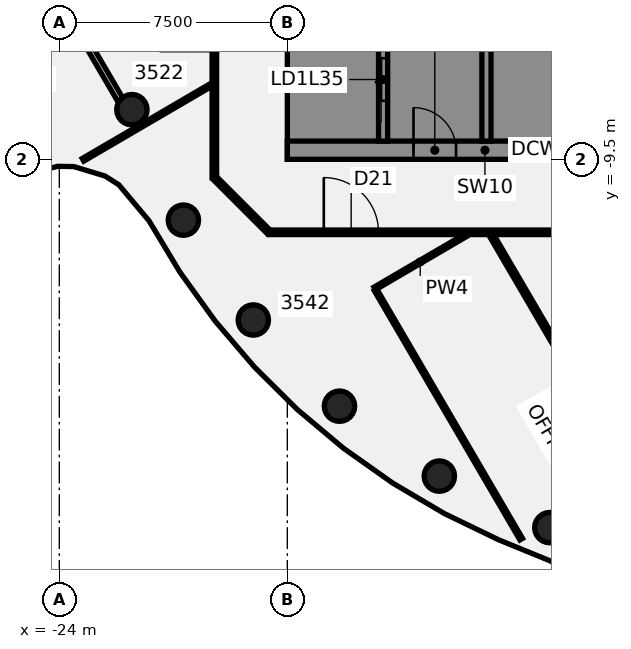
"""IFC4 building model, lengths in metres.
Left out: names, types, materials, properties, quantities, classifications, styles, units other than length and angle.
Written with IfcOpenShell. Run it as: python <this file> out.ifc"""

import sys

from ifc_helpers import new_model, si_unit, direction, frame, frame_2d, origin, origin_2d, place, context, subcontext, project, spatial, polyline, rectangle, circle, outline, extrude, element, fill, save


model = new_model("IFC4")
c1 = context("Model", 3, precision=1e-05, world=origin(), true_north=direction((0.0, 1.0)))
c2 = subcontext(c1, "Body", "Model", "MODEL_VIEW")
j1 = project(units=[si_unit("LENGTHUNIT", "METRE"), si_unit("PLANEANGLEUNIT", "RADIAN")], contexts=[c1])
p1 = place(None, origin())
s1 = spatial("IfcSite", under=j1, at=p1, CompositionType="ELEMENT")
p2 = place(p1, origin())
s2 = spatial("IfcBuilding", under=s1, at=p2, CompositionType="ELEMENT")
p3 = place(p2, frame((0.0, 0.0, 144.25)))
s3 = spatial("IfcBuildingStorey", under=s2, at=p3, CompositionType="ELEMENT", Elevation=144.25)
for number, where, z_axis, x_axis in (
    (1, (-21.613, -7.866, -0.14), (0.0, 0.0, 1.0), (1.0, 0.0, 0.0)),
    (2, (-19.919, -11.5, -0.14), (0.0, 0.0, 1.0), (1.0, 0.0, 0.0)),
    (3, (-17.619, -14.784, -0.14), (0.0, 0.0, 1.0), (1.0, 0.0, 0.0)),
    (4, (-14.784, -17.619, -0.14), (0.0, 0.0, 1.0), (1.0, 0.0, 0.0)),
    (5, (-11.5, -19.919, -0.14), (0.0, 0.0, 1.0), (1.0, 0.0, 0.0)),
    (6, (-7.866, -21.613, -0.14), (0.0, 0.0, 1.0), (1.0, 0.0, 0.0)),
):
    element("IfcColumn", number, at=place(p3, frame(where, z_axis=z_axis, x_axis=x_axis)), inside=s3, PredefinedType="COLUMN", context=c2, shape_type="SweptSolid", body=[
        extrude(circle(Radius=0.5, at=origin_2d()), origin(), (0.0, 0.0, 1.0), 3.75),
    ])
p4 = place(p3, frame((-28.66, 3.867, 0.0), z_axis=(0.0, 0.0, 1.0), x_axis=(0.504524218803, -0.863397540326, 0.0)))
e7 = element("IfcWall", 7, at=p4, inside=s3, PredefinedType="PARTITIONING", context=c2, shape_type="SweptSolid", body=[
    extrude(rectangle(XDim=13.22, YDim=0.2, at=frame_2d((6.61, 0.0))), origin(), (0.0, 0.0, 1.0), 3.01),
])
p5 = place(p4, frame((6.099, 0.0, 0.0)))
e8 = element("IfcOpeningElement", 8, at=p5, cuts=e7, PredefinedType="OPENING", context=c2, shape_type="SweptSolid", body=[
    extrude(rectangle(XDim=1.4, YDim=2.1, at=frame_2d((0.7, 1.05))), frame((0.0, 0.11, 0.0), z_axis=(0.0, -1.0, 0.0), x_axis=(1.0, 0.0, 0.0)), (0.0, 0.0, 1.0), 0.22),
])
p6 = place(p3, frame((-13.6, -13.79, 0.0), z_axis=(0.0, 0.0, 1.0), x_axis=(0.50451801346, -0.863401166373, 0.0)))
e9 = element("IfcWall", 9, at=p6, inside=s3, PredefinedType="PARTITIONING", context=c2, shape_type="SweptSolid", body=[
    extrude(rectangle(XDim=9.5, YDim=0.1, at=frame_2d((4.75, 0.0))), origin(), (0.0, 0.0, 1.0), 3.01),
])
p7 = place(p3, frame((-9.784, -11.995, 0.0), z_axis=(0.0, 0.0, 1.0), x_axis=(0.504549995646, -0.863382477175, 0.0)))
e10 = element("IfcWall", 10, at=p7, inside=s3, PredefinedType="PARTITIONING", context=c2, shape_type="SweptSolid", body=[
    extrude(rectangle(XDim=11.802, YDim=0.15, at=frame_2d((5.901, 0.0))), origin(), (0.0, 0.0, 1.0), 3.01),
])
p8 = place(p7, frame((3.79, 0.0, 0.0)))
e11 = element("IfcOpeningElement", 11, at=p8, cuts=e10, PredefinedType="OPENING", context=c2, shape_type="SweptSolid", body=[
    extrude(rectangle(XDim=0.9, YDim=2.1, at=frame_2d((0.45, 1.05))), frame((0.0, 0.085, 0.0), z_axis=(0.0, -1.0, 0.0), x_axis=(1.0, 0.0, 0.0)), (0.0, 0.0, 1.0), 0.17),
])
p9 = place(p3, frame((-18.872, -10.128, 0.0), z_axis=(0.0, 0.0, 1.0), x_axis=(0.707106781187, -0.707106781187, 0.0)))
e12 = element("IfcWall", 12, at=p9, inside=s3, PredefinedType="PARTITIONING", context=c2, shape_type="SweptSolid", body=[
    extrude(rectangle(XDim=2.465, YDim=0.15, at=frame_2d((1.232, 0.0))), origin(), (0.0, 0.0, 1.0), 3.01),
])
p10 = place(p3, frame((-17.1, -11.9, 0.0), z_axis=(0.0, 0.0, 1.0), x_axis=(1.0, 0.0, 0.0)))
e13 = element("IfcWall", 13, at=p10, inside=s3, PredefinedType="PARTITIONING", context=c2, shape_type="SweptSolid", body=[
    extrude(rectangle(XDim=34.165, YDim=0.15, at=frame_2d((17.083, 0.0))), origin(), (0.0, 0.0, 1.0), 3.01),
])
p11 = place(p10, frame((10.26, 0.0, 0.0)))
e14 = element("IfcOpeningElement", 14, at=p11, cuts=e13, PredefinedType="OPENING", context=c2, shape_type="SweptSolid", body=[
    extrude(rectangle(XDim=1.8, YDim=2.1, at=frame_2d((0.9, 1.05))), frame((0.0, 0.085, 0.0), z_axis=(0.0, -1.0, 0.0), x_axis=(1.0, 0.0, 0.0)), (0.0, 0.0, 1.0), 0.17),
])
p12 = place(p10, frame((1.8, 0.0, 0.0)))
e15 = element("IfcOpeningElement", 15, at=p12, cuts=e13, PredefinedType="OPENING", context=c2, shape_type="SweptSolid", body=[
    extrude(rectangle(XDim=1.8, YDim=2.1, at=frame_2d((0.9, 1.05))), frame((0.0, 0.085, 0.0), z_axis=(0.0, -1.0, 0.0), x_axis=(1.0, 0.0, 0.0)), (0.0, 0.0, 1.0), 0.17),
])
p13 = place(p10, frame((26.151, 0.0, 0.0)))
e16 = element("IfcOpeningElement", 16, at=p13, cuts=e13, PredefinedType="OPENING", context=c2, shape_type="SweptSolid", body=[
    extrude(rectangle(XDim=1.8, YDim=2.1, at=frame_2d((0.9, 1.05))), frame((0.0, 0.085, 0.0), z_axis=(0.0, -1.0, 0.0), x_axis=(1.0, 0.0, 0.0)), (0.0, 0.0, 1.0), 0.17),
])
p14 = place(p3, frame((-23.22, -9.516, 0.0), z_axis=(0.0, 0.0, 1.0), x_axis=(0.863381791964, 0.504551168173, 0.0)))
e17 = element("IfcWall", 17, at=p14, inside=s3, PredefinedType="PARTITIONING", context=c2, shape_type="SweptSolid", body=[
    extrude(rectangle(XDim=4.909, YDim=0.1, at=frame_2d((2.455, 0.0))), origin(), (0.0, 0.0, 1.0), 3.01),
])
p15 = place(p3, frame((-13.625, -13.747, 0.0), z_axis=(0.0, 0.0, 1.0), x_axis=(0.863323711201, 0.504650542136, 0.0)))
e18 = element("IfcWall", 18, at=p15, inside=s3, PredefinedType="PARTITIONING", context=c2, shape_type="SweptSolid", body=[
    extrude(rectangle(XDim=3.465, YDim=0.1, at=frame_2d((1.733, 0.0))), origin(), (0.0, 0.0, 1.0), 3.01),
])
p16 = place(p3, frame((-18.9, -10.1, 0.0), z_axis=(0.0, 0.0, 1.0), x_axis=(0.0, 1.0, 0.0)))
e19 = element("IfcWall", 19, at=p16, inside=s3, PredefinedType="PARTITIONING", context=c2, shape_type="SweptSolid", body=[
    extrude(rectangle(XDim=20.2, YDim=0.15, at=frame_2d((10.1, 0.0))), origin(), (0.0, 0.0, 1.0), 3.01),
])
p17 = place(p16, frame((11.874, 0.0, 0.0)))
e20 = element("IfcOpeningElement", 20, at=p17, cuts=e19, PredefinedType="OPENING", context=c2, shape_type="SweptSolid", body=[
    extrude(rectangle(XDim=1.8, YDim=2.1, at=frame_2d((0.9, 1.05))), frame((0.0, 0.085, 0.0), z_axis=(0.0, -1.0, 0.0), x_axis=(1.0, 0.0, 0.0)), (0.0, 0.0, 1.0), 0.17),
])
p18 = place(p16, frame((4.159, 0.0, 0.0)))
e21 = element("IfcOpeningElement", 21, at=p18, cuts=e19, PredefinedType="OPENING", context=c2, shape_type="SweptSolid", body=[
    extrude(rectangle(XDim=1.8, YDim=2.1, at=frame_2d((0.9, 1.05))), frame((0.0, 0.085, 0.0), z_axis=(0.0, -1.0, 0.0), x_axis=(1.0, 0.0, 0.0)), (0.0, 0.0, 1.0), 0.17),
])
p19 = place(p3, frame((-16.5, -9.2, 0.0), z_axis=(0.0, 0.0, 1.0), x_axis=(1.0, 0.0, 0.0)))
e22 = element("IfcWall", 22, at=p19, inside=s3, PredefinedType="SHEAR", context=c2, shape_type="SweptSolid", body=[
    extrude(rectangle(XDim=13.0, YDim=0.6, at=frame_2d((6.5, 0.0))), origin(), (0.0, 0.0, 1.0), 3.61),
])
p20 = place(p19, frame((4.15, 0.0, 0.0)))
e23 = element("IfcOpeningElement", 23, at=p20, cuts=e22, PredefinedType="OPENING", context=c2, shape_type="SweptSolid", body=[
    extrude(rectangle(XDim=1.4, YDim=2.1, at=frame_2d((0.7, 1.05))), frame((0.0, 0.31, 0.0), z_axis=(0.0, -1.0, 0.0), x_axis=(1.0, 0.0, 0.0)), (0.0, 0.0, 1.0), 0.62),
])
p21 = place(p19, frame((10.125, 0.0, 0.0)))
e24 = element("IfcOpeningElement", 24, at=p21, cuts=e22, PredefinedType="OPENING", context=c2, shape_type="SweptSolid", body=[
    extrude(rectangle(XDim=1.4, YDim=2.1, at=frame_2d((0.7, 1.05))), frame((0.0, 0.31, 0.0), z_axis=(0.0, -1.0, 0.0), x_axis=(1.0, 0.0, 0.0)), (0.0, 0.0, 1.0), 0.62),
])
p22 = place(p3, origin())
e25 = element("IfcWall", 25, at=p22, inside=s3, PredefinedType="SHEAR", context=c2, shape_type="SweptSolid", body=[
    extrude(outline(polyline([(-13.5, -8.125), (-15.9, -8.125), (-15.9, -5.625), (-13.5, -5.625), (-13.5, -5.375), (-15.9, -5.375), (-15.9, 5.375), (-13.5, 5.375), (-13.5, 5.625), (-15.9, 5.625), (-15.9, 8.125), (-13.5, 8.125), (-13.5, 8.9), (-15.9, 8.9), (-16.5, 8.9), (-16.5, -8.9), (-15.9, -8.9), (-13.5, -8.9), (-13.5, -8.125)])), origin(), (0.0, 0.0, 1.0), 3.61),
])
p23 = place(p3, origin())
e26 = element("IfcWall", 26, at=p23, inside=s3, PredefinedType="SHEAR", context=c2, shape_type="SweptSolid", body=[
    extrude(outline(polyline([(-7.5, -8.125), (-9.55, -8.125), (-9.55, -5.625), (-9.8, -5.625), (-9.8, -8.125), (-9.8, -8.9), (-7.5, -8.9), (-7.5, -8.125)])), origin(), (0.0, 0.0, 1.0), 3.61),
])
p24 = place(p3, frame((-13.35, -8.9, 0.0), z_axis=(0.0, 0.0, 1.0), x_axis=(0.0, 1.0, 0.0)))
e27 = element("IfcWall", 27, at=p24, inside=s3, PredefinedType="SHEAR", context=c2, shape_type="SweptSolid", body=[
    extrude(rectangle(XDim=17.8, YDim=0.3, at=frame_2d((8.9, 0.0))), origin(), (0.0, 0.0, 1.0), 3.61),
])
p25 = place(p24, frame((1.325, 0.0, 0.0)))
e28 = element("IfcOpeningElement", 28, at=p25, cuts=e27, PredefinedType="OPENING", context=c2, shape_type="SweptSolid", body=[
    extrude(rectangle(XDim=1.4, YDim=2.1, at=frame_2d((0.7, 1.05))), frame((0.0, 0.16, 0.0), z_axis=(0.0, -1.0, 0.0), x_axis=(1.0, 0.0, 0.0)), (0.0, 0.0, 1.0), 0.32),
])
p26 = place(p24, frame((4.754, 0.0, 0.0)))
e29 = element("IfcOpeningElement", 29, at=p26, cuts=e27, PredefinedType="OPENING", context=c2, shape_type="SweptSolid", body=[
    extrude(rectangle(XDim=1.0, YDim=2.1, at=frame_2d((0.5, 1.05))), frame((0.0, 0.16, 0.0), z_axis=(0.0, -1.0, 0.0), x_axis=(1.0, 0.0, 0.0)), (0.0, 0.0, 1.0), 0.32),
])
p27 = place(p24, frame((10.254, 0.0, 0.0)))
e30 = element("IfcOpeningElement", 30, at=p27, cuts=e27, PredefinedType="OPENING", context=c2, shape_type="SweptSolid", body=[
    extrude(rectangle(XDim=1.0, YDim=2.1, at=frame_2d((0.5, 1.05))), frame((0.0, 0.16, 0.0), z_axis=(0.0, -1.0, 0.0), x_axis=(1.0, 0.0, 0.0)), (0.0, 0.0, 1.0), 0.32),
])
p28 = place(p3, frame((-9.95, -8.9, 0.0), z_axis=(0.0, 0.0, 1.0), x_axis=(0.0, 1.0, 0.0)))
e31 = element("IfcWall", 31, at=p28, inside=s3, PredefinedType="SHEAR", context=c2, shape_type="SweptSolid", body=[
    extrude(rectangle(XDim=17.8, YDim=0.3, at=frame_2d((8.9, 0.0))), origin(), (0.0, 0.0, 1.0), 3.61),
])
p29 = place(p28, frame((4.175, 0.0, 0.0)))
e32 = element("IfcOpeningElement", 32, at=p29, cuts=e31, PredefinedType="OPENING", context=c2, shape_type="SweptSolid", body=[
    extrude(rectangle(XDim=1.2, YDim=2.1, at=frame_2d((0.6, 1.05))), frame((0.0, 0.16, 0.0), z_axis=(0.0, -1.0, 0.0), x_axis=(1.0, 0.0, 0.0)), (0.0, 0.0, 1.0), 0.32),
])
p30 = place(p28, frame((6.925, 0.0, 0.0)))
e33 = element("IfcOpeningElement", 33, at=p30, cuts=e31, PredefinedType="OPENING", context=c2, shape_type="SweptSolid", body=[
    extrude(rectangle(XDim=1.2, YDim=2.1, at=frame_2d((0.6, 1.05))), frame((0.0, 0.16, 0.0), z_axis=(0.0, -1.0, 0.0), x_axis=(1.0, 0.0, 0.0)), (0.0, 0.0, 1.0), 0.32),
])
p31 = place(p8, frame((0.9, 0.0, 0.0), z_axis=(0.0, 0.0, 1.0), x_axis=(-1.0, 0.0, 0.0)))
e34 = element("IfcDoor", 34, at=p31, inside=s3, OperationType="SINGLE_SWING_LEFT", PredefinedType="DOOR", context=c2, shape_type="SweptSolid", body=[
    extrude(rectangle(XDim=0.9, YDim=2.1, at=frame_2d((0.45, 1.05))), frame((0.0, 0.025, 0.0), z_axis=(0.0, -1.0, 0.0), x_axis=(1.0, 0.0, 0.0)), (0.0, 0.0, 1.0), 0.05),
])
fill(e11, e34)
p32 = place(p12, frame((1.8, 0.0, 0.0), z_axis=(0.0, 0.0, 1.0), x_axis=(-1.0, 0.0, 0.0)))
e35 = element("IfcDoor", 35, at=p32, inside=s3, OperationType="DOUBLE_DOOR_SINGLE_SWING", PredefinedType="DOOR", context=c2, shape_type="SweptSolid", body=[
    extrude(rectangle(XDim=1.8, YDim=2.1, at=frame_2d((0.9, 1.05))), frame((0.0, 0.025, 0.0), z_axis=(0.0, -1.0, 0.0), x_axis=(1.0, 0.0, 0.0)), (0.0, 0.0, 1.0), 0.05),
])
fill(e15, e35)
p33 = place(p20, origin())
e36 = element("IfcDoor", 36, at=p33, inside=s3, OperationType="SINGLE_SWING_LEFT", PredefinedType="DOOR", context=c2, shape_type="SweptSolid", body=[
    extrude(rectangle(XDim=1.4, YDim=2.1, at=frame_2d((0.7, 1.05))), frame((0.0, 0.025, 0.0), z_axis=(0.0, -1.0, 0.0), x_axis=(1.0, 0.0, 0.0)), (0.0, 0.0, 1.0), 0.05),
])
fill(e23, e36)
p34 = place(p25, origin())
e37 = element("IfcDoor", 37, at=p34, inside=s3, OperationType="SLIDING_TO_LEFT", PredefinedType="DOOR", context=c2, shape_type="SweptSolid", body=[
    extrude(rectangle(XDim=1.4, YDim=2.1, at=frame_2d((0.7, 1.05))), frame((0.0, 0.025, 0.0), z_axis=(0.0, -1.0, 0.0), x_axis=(1.0, 0.0, 0.0)), (0.0, 0.0, 1.0), 0.05),
])
fill(e28, e37)
save(model, sys.argv[1])
